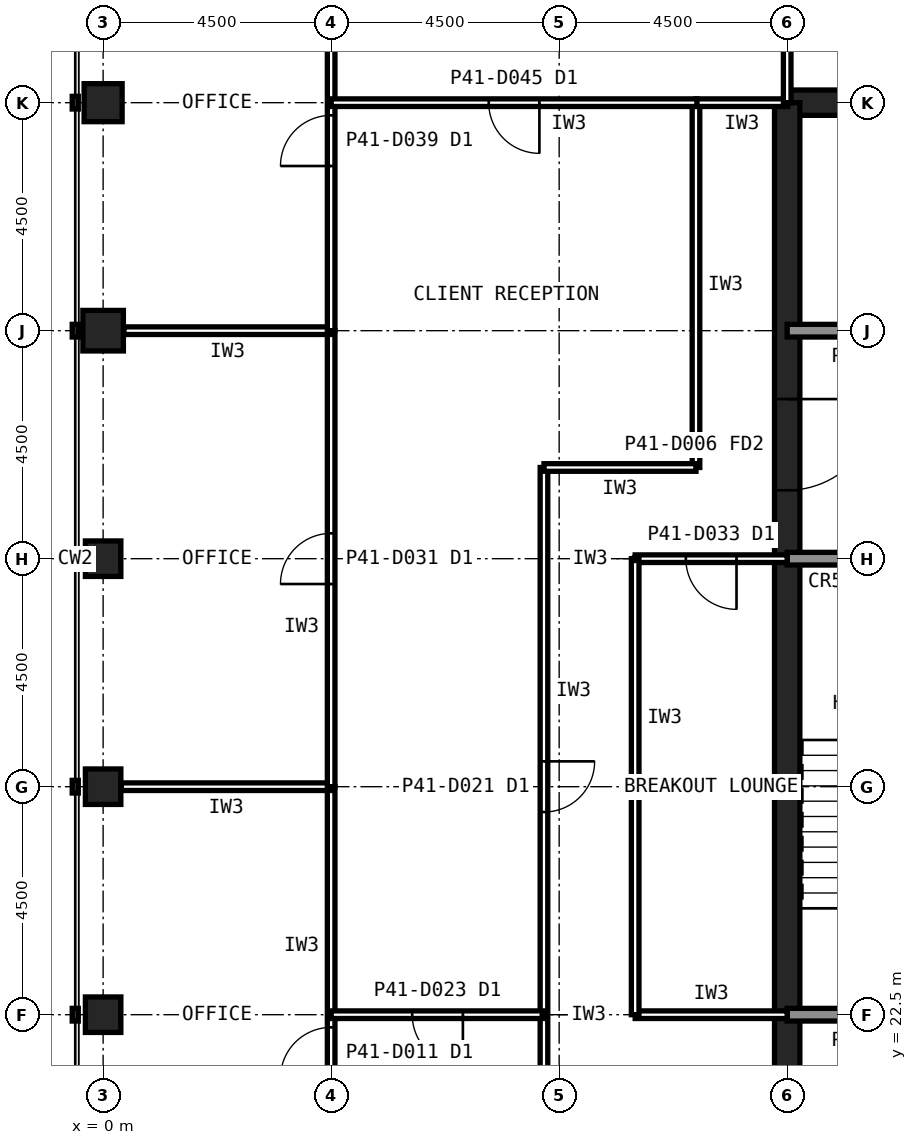
"""IFC4 building model, lengths in metres.
Left out: names, types, materials, properties, quantities, classifications, styles, units other than length and angle.
Written with IfcOpenShell. Run it as: python <this file> out.ifc"""

import sys

from ifc_helpers import new_model, si_unit, direction, frame, frame_2d, origin, origin_2d, place, context, subcontext, project, spatial, rectangle, hollow_rectangle, extrude, element, fill, save


model = new_model("IFC4")
c1 = context("Model", 3, precision=1e-05, world=origin(), true_north=direction((0.0, 1.0)))
c2 = subcontext(c1, "Body", "Model", "MODEL_VIEW")
j1 = project(units=[si_unit("LENGTHUNIT", "METRE"), si_unit("PLANEANGLEUNIT", "RADIAN")], contexts=[c1])
p1 = place(None, origin())
s1 = spatial("IfcSite", under=j1, at=p1, CompositionType="ELEMENT")
p2 = place(p1, origin())
s2 = spatial("IfcBuilding", under=s1, at=p2, CompositionType="ELEMENT")
p3 = place(p2, frame((0.0, 0.0, 175.6)))
s3 = spatial("IfcBuildingStorey", under=s2, at=p3, CompositionType="ELEMENT", Elevation=175.6)
p4 = place(p3, frame((0.0, 40.5, 0.0), z_axis=(0.0, 0.0, 1.0), x_axis=(1.0, 0.0, 0.0)))
e1 = element("IfcColumn", 1, at=p4, inside=s3, PredefinedType="COLUMN", context=c2, shape_type="SweptSolid", body=[
    extrude(hollow_rectangle(XDim=0.75, YDim=0.75, WallThickness=0.04, at=origin_2d()), origin(), (0.0, 0.0, 1.0), 4.0),
])
p5 = place(p3, frame((0.0, 36.0, 0.0), z_axis=(0.0, 0.0, 1.0), x_axis=(1.0, 0.0, 0.0)))
e2 = element("IfcColumn", 2, at=p5, inside=s3, PredefinedType="COLUMN", context=c2, shape_type="SweptSolid", body=[
    extrude(hollow_rectangle(XDim=0.8, YDim=0.8, WallThickness=0.045, at=origin_2d()), origin(), (0.0, 0.0, 1.0), 4.0),
])
for number, where, z_axis, x_axis in (
    (3, (0.0, 31.5, 0.0), (0.0, 0.0, 1.0), (1.0, 0.0, 0.0)),
    (4, (0.0, 27.0, 0.0), (0.0, 0.0, 1.0), (1.0, 0.0, 0.0)),
    (5, (0.0, 22.5, 0.0), (0.0, 0.0, 1.0), (1.0, 0.0, 0.0)),
):
    element("IfcColumn", number, at=place(p3, frame(where, z_axis=z_axis, x_axis=x_axis)), inside=s3, PredefinedType="COLUMN", context=c2, shape_type="SweptSolid", body=[
        extrude(hollow_rectangle(XDim=0.7, YDim=0.7, WallThickness=0.036, at=origin_2d()), origin(), (0.0, 0.0, 1.0), 4.0),
    ])
p6 = place(p3, frame((40.5, 40.5, 0.0), z_axis=(0.0, 0.0, 1.0), x_axis=(-1.0, 0.0, 0.0)))
e6 = element("IfcWall", 6, at=p6, inside=s3, PredefinedType="SHEAR", context=c2, shape_type="SweptSolid", body=[
    extrude(rectangle(XDim=27.0, YDim=0.5, at=frame_2d((13.5, 0.0))), origin(), (0.0, 0.0, 1.0), 4.0),
])
p7 = place(p3, frame((13.5, 40.5, 0.0), z_axis=(0.0, 0.0, 1.0), x_axis=(0.0, -1.0, 0.0)))
e7 = element("IfcWall", 7, at=p7, inside=s3, PredefinedType="SHEAR", context=c2, shape_type="SweptSolid", body=[
    extrude(rectangle(XDim=27.0, YDim=0.5, at=frame_2d((13.5, 0.0))), origin(), (0.0, 0.0, 1.0), 4.0),
])
p8 = place(p7, frame((19.65, 0.0, 0.0)))
e8 = element("IfcOpeningElement", 8, at=p8, cuts=e7, PredefinedType="OPENING", context=c2, shape_type="SweptSolid", body=[
    extrude(rectangle(XDim=1.2, YDim=2.1, at=frame_2d((0.6, 1.05))), frame((0.0, 0.26, 0.0), z_axis=(0.0, -1.0, 0.0), x_axis=(1.0, 0.0, 0.0)), (0.0, 0.0, 1.0), 0.52),
])
p9 = place(p7, frame((5.85, 0.0, 0.0)))
e9 = element("IfcOpeningElement", 9, at=p9, cuts=e7, PredefinedType="OPENING", context=c2, shape_type="SweptSolid", body=[
    extrude(rectangle(XDim=1.8, YDim=2.1, at=frame_2d((0.9, 1.05))), frame((0.0, 0.26, 0.0), z_axis=(0.0, -1.0, 0.0), x_axis=(1.0, 0.0, 0.0)), (0.0, 0.0, 1.0), 0.52),
])
p10 = place(p3, frame((13.5, 36.0, 0.0), z_axis=(0.0, 0.0, 1.0), x_axis=(1.0, 0.0, 0.0)))
e10 = element("IfcWall", 10, at=p10, inside=s3, PredefinedType="SOLIDWALL", context=c2, shape_type="SweptSolid", body=[
    extrude(rectangle(XDim=27.0, YDim=0.25, at=frame_2d((13.5, 0.0))), origin(), (0.0, 0.0, 1.0), 3.84),
])
p11 = place(p10, frame((1.8, 0.0, 0.0)))
e11 = element("IfcOpeningElement", 11, at=p11, cuts=e10, PredefinedType="OPENING", context=c2, shape_type="SweptSolid", body=[
    extrude(rectangle(XDim=0.9, YDim=2.1, at=frame_2d((0.45, 1.05))), frame((0.0, 0.135, 0.0), z_axis=(0.0, -1.0, 0.0), x_axis=(1.0, 0.0, 0.0)), (0.0, 0.0, 1.0), 0.27),
])
p12 = place(p10, frame((5.55, 0.0, 0.0)))
e12 = element("IfcOpeningElement", 12, at=p12, cuts=e10, PredefinedType="OPENING", context=c2, shape_type="SweptSolid", body=[
    extrude(rectangle(XDim=0.9, YDim=2.1, at=frame_2d((0.45, 1.05))), frame((0.0, 0.135, 0.0), z_axis=(0.0, -1.0, 0.0), x_axis=(1.0, 0.0, 0.0)), (0.0, 0.0, 1.0), 0.27),
])
p13 = place(p10, frame((8.55, 0.0, 0.0)))
e13 = element("IfcOpeningElement", 13, at=p13, cuts=e10, PredefinedType="OPENING", context=c2, shape_type="SweptSolid", body=[
    extrude(rectangle(XDim=0.9, YDim=2.1, at=frame_2d((0.45, 1.05))), frame((0.0, 0.135, 0.0), z_axis=(0.0, -1.0, 0.0), x_axis=(1.0, 0.0, 0.0)), (0.0, 0.0, 1.0), 0.27),
])
p14 = place(p10, frame((11.55, 0.0, 0.0)))
e14 = element("IfcOpeningElement", 14, at=p14, cuts=e10, PredefinedType="OPENING", context=c2, shape_type="SweptSolid", body=[
    extrude(rectangle(XDim=0.9, YDim=2.1, at=frame_2d((0.45, 1.05))), frame((0.0, 0.135, 0.0), z_axis=(0.0, -1.0, 0.0), x_axis=(1.0, 0.0, 0.0)), (0.0, 0.0, 1.0), 0.27),
])
p15 = place(p10, frame((24.1, 0.0, 0.0)))
e15 = element("IfcOpeningElement", 15, at=p15, cuts=e10, PredefinedType="OPENING", context=c2, shape_type="SweptSolid", body=[
    extrude(rectangle(XDim=1.3, YDim=2.2, at=frame_2d((0.65, 1.1))), frame((0.0, 0.135, 0.0), z_axis=(0.0, -1.0, 0.0), x_axis=(1.0, 0.0, 0.0)), (0.0, 0.0, 1.0), 0.27),
])
p16 = place(p3, frame((13.5, 22.5, 0.0), z_axis=(0.0, 0.0, 1.0), x_axis=(1.0, 0.0, 0.0)))
e16 = element("IfcWall", 16, at=p16, inside=s3, PredefinedType="SOLIDWALL", context=c2, shape_type="SweptSolid", body=[
    extrude(rectangle(XDim=27.0, YDim=0.25, at=frame_2d((13.5, 0.0))), origin(), (0.0, 0.0, 1.0), 3.84),
])
p17 = place(p16, frame((1.65, 0.0, 0.0)))
e17 = element("IfcOpeningElement", 17, at=p17, cuts=e16, PredefinedType="OPENING", context=c2, shape_type="SweptSolid", body=[
    extrude(rectangle(XDim=1.2, YDim=2.1, at=frame_2d((0.6, 1.05))), frame((0.0, 0.135, 0.0), z_axis=(0.0, -1.0, 0.0), x_axis=(1.0, 0.0, 0.0)), (0.0, 0.0, 1.0), 0.27),
])
p18 = place(p16, frame((6.025, 0.0, 0.0)))
e18 = element("IfcOpeningElement", 18, at=p18, cuts=e16, PredefinedType="OPENING", context=c2, shape_type="SweptSolid", body=[
    extrude(rectangle(XDim=1.0, YDim=2.1, at=frame_2d((0.5, 1.05))), frame((0.0, 0.135, 0.0), z_axis=(0.0, -1.0, 0.0), x_axis=(1.0, 0.0, 0.0)), (0.0, 0.0, 1.0), 0.27),
])
p19 = place(p16, frame((10.525, 0.0, 0.0)))
e19 = element("IfcOpeningElement", 19, at=p19, cuts=e16, PredefinedType="OPENING", context=c2, shape_type="SweptSolid", body=[
    extrude(rectangle(XDim=1.0, YDim=2.1, at=frame_2d((0.5, 1.05))), frame((0.0, 0.135, 0.0), z_axis=(0.0, -1.0, 0.0), x_axis=(1.0, 0.0, 0.0)), (0.0, 0.0, 1.0), 0.27),
])
p20 = place(p16, frame((19.75, 0.0, 0.0)))
e20 = element("IfcOpeningElement", 20, at=p20, cuts=e16, PredefinedType="OPENING", context=c2, shape_type="SweptSolid", body=[
    extrude(rectangle(XDim=1.0, YDim=2.1, at=frame_2d((0.5, 1.05))), frame((0.0, 0.135, 0.0), z_axis=(0.0, -1.0, 0.0), x_axis=(1.0, 0.0, 0.0)), (0.0, 0.0, 1.0), 0.27),
])
p21 = place(p16, frame((15.05, 0.0, 0.0)))
e21 = element("IfcOpeningElement", 21, at=p21, cuts=e16, PredefinedType="OPENING", context=c2, shape_type="SweptSolid", body=[
    extrude(rectangle(XDim=1.4, YDim=2.4, at=frame_2d((0.7, 1.2))), frame((0.0, 0.135, 0.0), z_axis=(0.0, -1.0, 0.0), x_axis=(1.0, 0.0, 0.0)), (0.0, 0.0, 1.0), 0.27),
])
p22 = place(p3, frame((13.5, 31.5, 0.0), z_axis=(0.0, 0.0, 1.0), x_axis=(1.0, 0.0, 0.0)))
e22 = element("IfcWall", 22, at=p22, inside=s3, PredefinedType="SOLIDWALL", context=c2, shape_type="SweptSolid", body=[
    extrude(rectangle(XDim=27.0, YDim=0.25, at=frame_2d((13.5, 0.0))), origin(), (0.0, 0.0, 1.0), 3.84),
])
p23 = place(p22, frame((24.15, 0.0, 0.0)))
e23 = element("IfcOpeningElement", 23, at=p23, cuts=e22, PredefinedType="OPENING", context=c2, shape_type="SweptSolid", body=[
    extrude(rectangle(XDim=1.2, YDim=2.1, at=frame_2d((0.6, 1.05))), frame((0.0, 0.135, 0.0), z_axis=(0.0, -1.0, 0.0), x_axis=(1.0, 0.0, 0.0)), (0.0, 0.0, 1.0), 0.27),
])
p24 = place(p22, frame((15.3, 0.0, 0.0)))
e24 = element("IfcOpeningElement", 24, at=p24, cuts=e22, PredefinedType="OPENING", context=c2, shape_type="SweptSolid", body=[
    extrude(rectangle(XDim=0.9, YDim=2.1, at=frame_2d((0.45, 1.05))), frame((0.0, 0.135, 0.0), z_axis=(0.0, -1.0, 0.0), x_axis=(1.0, 0.0, 0.0)), (0.0, 0.0, 1.0), 0.27),
])
p25 = place(p22, frame((19.8, 0.0, 0.0)))
e25 = element("IfcOpeningElement", 25, at=p25, cuts=e22, PredefinedType="OPENING", context=c2, shape_type="SweptSolid", body=[
    extrude(rectangle(XDim=0.9, YDim=2.1, at=frame_2d((0.45, 1.05))), frame((0.0, 0.135, 0.0), z_axis=(0.0, -1.0, 0.0), x_axis=(1.0, 0.0, 0.0)), (0.0, 0.0, 1.0), 0.27),
])
p26 = place(p3, frame((8.7, 33.3, 0.0), z_axis=(0.0, 0.0, 1.0), x_axis=(0.0, -1.0, 0.0)))
e26 = element("IfcWall", 26, at=p26, inside=s3, PredefinedType="PARTITIONING", context=c2, shape_type="SweptSolid", body=[
    extrude(rectangle(XDim=12.6, YDim=0.15, at=frame_2d((6.3, 0.0))), origin(), (0.0, 0.0, 1.0), 3.84),
])
p27 = place(p26, frame((5.8, 0.0, 0.0)))
e27 = element("IfcOpeningElement", 27, at=p27, cuts=e26, PredefinedType="OPENING", context=c2, shape_type="SweptSolid", body=[
    extrude(rectangle(XDim=1.0, YDim=2.1, at=frame_2d((0.5, 1.05))), frame((0.0, 0.085, 0.0), z_axis=(0.0, -1.0, 0.0), x_axis=(1.0, 0.0, 0.0)), (0.0, 0.0, 1.0), 0.17),
])
p28 = place(p3, frame((11.7, 40.5, 0.0), z_axis=(0.0, 0.0, 1.0), x_axis=(0.0, -1.0, 0.0)))
e28 = element("IfcWall", 28, at=p28, inside=s3, PredefinedType="PARTITIONING", context=c2, shape_type="SweptSolid", body=[
    extrude(rectangle(XDim=7.2, YDim=0.15, at=frame_2d((3.6, 0.0))), origin(), (0.0, 0.0, 1.0), 3.84),
])
p29 = place(p3, frame((11.7, 33.3, 0.0), z_axis=(0.0, 0.0, 1.0), x_axis=(-1.0, 0.0, 0.0)))
e29 = element("IfcWall", 29, at=p29, inside=s3, PredefinedType="PARTITIONING", context=c2, shape_type="SweptSolid", body=[
    extrude(rectangle(XDim=3.0, YDim=0.15, at=frame_2d((1.5, 0.0))), origin(), (0.0, 0.0, 1.0), 3.84),
])
p30 = place(p3, frame((13.51, 40.5, 0.0), z_axis=(0.0, 0.0, 1.0), x_axis=(-1.0, 0.0, 0.0)))
e30 = element("IfcWall", 30, at=p30, inside=s3, PredefinedType="PARTITIONING", context=c2, shape_type="SweptSolid", body=[
    extrude(rectangle(XDim=1.81, YDim=0.15, at=frame_2d((0.905, 0.0))), origin(), (0.0, 0.0, 1.0), 2.989),
])
p31 = place(p3, frame((4.5, 18.0, 0.0), z_axis=(0.0, 0.0, 1.0), x_axis=(0.0, 1.0, 0.0)))
e31 = element("IfcWall", 31, at=p31, inside=s3, PredefinedType="PARTITIONING", context=c2, shape_type="SweptSolid", body=[
    extrude(rectangle(XDim=9.0, YDim=0.15, at=frame_2d((4.5, 0.0))), origin(), (0.0, 0.0, 1.0), 3.84),
])
p32 = place(p31, frame((3.25, 0.0, 0.0)))
e32 = element("IfcOpeningElement", 32, at=p32, cuts=e31, PredefinedType="OPENING", context=c2, shape_type="SweptSolid", body=[
    extrude(rectangle(XDim=1.0, YDim=2.1, at=frame_2d((0.5, 1.05))), frame((0.0, 0.085, 0.0), z_axis=(0.0, -1.0, 0.0), x_axis=(1.0, 0.0, 0.0)), (0.0, 0.0, 1.0), 0.17),
])
p33 = place(p3, frame((4.5, 27.0, 0.0), z_axis=(0.0, 0.0, 1.0), x_axis=(-1.0, 0.0, 0.0)))
e33 = element("IfcWall", 33, at=p33, inside=s3, PredefinedType="PARTITIONING", context=c2, shape_type="SweptSolid", body=[
    extrude(rectangle(XDim=4.14, YDim=0.15, at=frame_2d((2.07, 0.0))), origin(), (0.0, 0.0, 1.0), 2.989),
])
p34 = place(p3, frame((4.5, 27.0, 0.0), z_axis=(0.0, 0.0, 1.0), x_axis=(0.0, 1.0, 0.0)))
e34 = element("IfcWall", 34, at=p34, inside=s3, PredefinedType="PARTITIONING", context=c2, shape_type="SweptSolid", body=[
    extrude(rectangle(XDim=9.0, YDim=0.15, at=frame_2d((4.5, 0.0))), origin(), (0.0, 0.0, 1.0), 3.84),
])
p35 = place(p34, frame((4.0, 0.0, 0.0)))
e35 = element("IfcOpeningElement", 35, at=p35, cuts=e34, PredefinedType="OPENING", context=c2, shape_type="SweptSolid", body=[
    extrude(rectangle(XDim=1.0, YDim=2.1, at=frame_2d((0.5, 1.05))), frame((0.0, 0.085, 0.0), z_axis=(0.0, -1.0, 0.0), x_axis=(1.0, 0.0, 0.0)), (0.0, 0.0, 1.0), 0.17),
])
p36 = place(p3, frame((4.5, 36.0, 0.0), z_axis=(0.0, 0.0, 1.0), x_axis=(-1.0, 0.0, 0.0)))
e36 = element("IfcWall", 36, at=p36, inside=s3, PredefinedType="PARTITIONING", context=c2, shape_type="SweptSolid", body=[
    extrude(rectangle(XDim=4.09, YDim=0.15, at=frame_2d((2.045, 0.0))), origin(), (0.0, 0.0, 1.0), 2.989),
])
p37 = place(p3, frame((4.5, 36.0, 0.0), z_axis=(0.0, 0.0, 1.0), x_axis=(0.0, 1.0, 0.0)))
e37 = element("IfcWall", 37, at=p37, inside=s3, PredefinedType="PARTITIONING", context=c2, shape_type="SweptSolid", body=[
    extrude(rectangle(XDim=9.0, YDim=0.15, at=frame_2d((4.5, 0.0))), origin(), (0.0, 0.0, 1.0), 3.84),
])
p38 = place(p37, frame((3.25, 0.0, 0.0)))
e38 = element("IfcOpeningElement", 38, at=p38, cuts=e37, PredefinedType="OPENING", context=c2, shape_type="SweptSolid", body=[
    extrude(rectangle(XDim=1.0, YDim=2.1, at=frame_2d((0.5, 1.05))), frame((0.0, 0.085, 0.0), z_axis=(0.0, -1.0, 0.0), x_axis=(1.0, 0.0, 0.0)), (0.0, 0.0, 1.0), 0.17),
])
p39 = place(p3, frame((10.5, 22.5, 0.0), z_axis=(0.0, 0.0, 1.0), x_axis=(1.0, 0.0, 0.0)))
e39 = element("IfcWall", 39, at=p39, inside=s3, PredefinedType="PARTITIONING", context=c2, shape_type="SweptSolid", body=[
    extrude(rectangle(XDim=3.0, YDim=0.15, at=frame_2d((1.5, 0.0))), origin(), (0.0, 0.0, 1.0), 2.989),
])
p40 = place(p3, frame((13.5, 31.5, 0.0), z_axis=(0.0, 0.0, 1.0), x_axis=(-1.0, 0.0, 0.0)))
e40 = element("IfcWall", 40, at=p40, inside=s3, PredefinedType="PARTITIONING", context=c2, shape_type="SweptSolid", body=[
    extrude(rectangle(XDim=3.0, YDim=0.15, at=frame_2d((1.5, 0.0))), origin(), (0.0, 0.0, 1.0), 2.989),
])
p41 = place(p40, frame((1.0, 0.0, 0.0)))
e41 = element("IfcOpeningElement", 41, at=p41, cuts=e40, PredefinedType="OPENING", context=c2, shape_type="SweptSolid", body=[
    extrude(rectangle(XDim=1.0, YDim=2.1, at=frame_2d((0.5, 1.05))), frame((0.0, 0.085, 0.0), z_axis=(0.0, -1.0, 0.0), x_axis=(1.0, 0.0, 0.0)), (0.0, 0.0, 1.0), 0.17),
])
p42 = place(p3, frame((10.5, 31.5, 0.0), z_axis=(0.0, 0.0, 1.0), x_axis=(0.0, -1.0, 0.0)))
e42 = element("IfcWall", 42, at=p42, inside=s3, PredefinedType="PARTITIONING", context=c2, shape_type="SweptSolid", body=[
    extrude(rectangle(XDim=9.0, YDim=0.15, at=frame_2d((4.5, 0.0))), origin(), (0.0, 0.0, 1.0), 3.84),
])
p43 = place(p3, frame((13.5, 40.5, 0.0), z_axis=(0.0, 0.0, 1.0), x_axis=(0.0, 1.0, 0.0)))
e43 = element("IfcWall", 43, at=p43, inside=s3, PredefinedType="PARTITIONING", context=c2, shape_type="SweptSolid", body=[
    extrude(rectangle(XDim=13.105, YDim=0.15, at=frame_2d((6.552, 0.0))), origin(), (0.0, 0.0, 1.0), 2.989),
])
p44 = place(p43, frame((6.052, 0.0, 0.0)))
e44 = element("IfcOpeningElement", 44, at=p44, cuts=e43, PredefinedType="OPENING", context=c2, shape_type="SweptSolid", body=[
    extrude(rectangle(XDim=1.0, YDim=2.1, at=frame_2d((0.5, 1.05))), frame((0.0, 0.085, 0.0), z_axis=(0.0, -1.0, 0.0), x_axis=(1.0, 0.0, 0.0)), (0.0, 0.0, 1.0), 0.17),
])
p45 = place(p3, frame((11.72, 40.5, 0.0), z_axis=(0.0, 0.0, 1.0), x_axis=(-1.0, 0.0, 0.0)))
e45 = element("IfcWall", 45, at=p45, inside=s3, PredefinedType="PARTITIONING", context=c2, shape_type="SweptSolid", body=[
    extrude(rectangle(XDim=7.22, YDim=0.15, at=frame_2d((3.61, 0.0))), origin(), (0.0, 0.0, 1.0), 2.989),
])
p46 = place(p45, frame((3.11, 0.0, 0.0)))
e46 = element("IfcOpeningElement", 46, at=p46, cuts=e45, PredefinedType="OPENING", context=c2, shape_type="SweptSolid", body=[
    extrude(rectangle(XDim=1.0, YDim=2.1, at=frame_2d((0.5, 1.05))), frame((0.0, 0.085, 0.0), z_axis=(0.0, -1.0, 0.0), x_axis=(1.0, 0.0, 0.0)), (0.0, 0.0, 1.0), 0.17),
])
p47 = place(p3, frame((8.7, 22.5, 0.0), z_axis=(0.0, 0.0, 1.0), x_axis=(-1.0, 0.0, 0.0)))
e47 = element("IfcWall", 47, at=p47, inside=s3, PredefinedType="PARTITIONING", context=c2, shape_type="SweptSolid", body=[
    extrude(rectangle(XDim=4.2, YDim=0.15, at=frame_2d((2.1, 0.0))), origin(), (0.0, 0.0, 1.0), 2.989),
])
p48 = place(p47, frame((1.6, 0.0, 0.0)))
e48 = element("IfcOpeningElement", 48, at=p48, cuts=e47, PredefinedType="OPENING", context=c2, shape_type="SweptSolid", body=[
    extrude(rectangle(XDim=1.0, YDim=2.1, at=frame_2d((0.5, 1.05))), frame((0.0, 0.085, 0.0), z_axis=(0.0, -1.0, 0.0), x_axis=(1.0, 0.0, 0.0)), (0.0, 0.0, 1.0), 0.17),
])
p49 = place(p9, origin())
e49 = element("IfcDoor", 49, at=p49, inside=s3, OperationType="SINGLE_SWING_LEFT", PredefinedType="DOOR", context=c2, shape_type="SweptSolid", body=[
    extrude(rectangle(XDim=1.8, YDim=2.1, at=frame_2d((0.9, 1.05))), frame((0.0, 0.025, 0.0), z_axis=(0.0, -1.0, 0.0), x_axis=(1.0, 0.0, 0.0)), (0.0, 0.0, 1.0), 0.05),
])
fill(e9, e49)
p50 = place(p27, origin())
e50 = element("IfcDoor", 50, at=p50, inside=s3, OperationType="SINGLE_SWING_LEFT", PredefinedType="DOOR", context=c2, shape_type="SweptSolid", body=[
    extrude(rectangle(XDim=1.0, YDim=2.1, at=frame_2d((0.5, 1.05))), frame((0.0, 0.025, 0.0), z_axis=(0.0, -1.0, 0.0), x_axis=(1.0, 0.0, 0.0)), (0.0, 0.0, 1.0), 0.05),
])
fill(e27, e50)
p51 = place(p32, origin())
e51 = element("IfcDoor", 51, at=p51, inside=s3, OperationType="SINGLE_SWING_LEFT", PredefinedType="DOOR", context=c2, shape_type="SweptSolid", body=[
    extrude(rectangle(XDim=1.0, YDim=2.1, at=frame_2d((0.5, 1.05))), frame((0.0, 0.025, 0.0), z_axis=(0.0, -1.0, 0.0), x_axis=(1.0, 0.0, 0.0)), (0.0, 0.0, 1.0), 0.05),
])
fill(e32, e51)
p52 = place(p35, origin())
e52 = element("IfcDoor", 52, at=p52, inside=s3, OperationType="SINGLE_SWING_LEFT", PredefinedType="DOOR", context=c2, shape_type="SweptSolid", body=[
    extrude(rectangle(XDim=1.0, YDim=2.1, at=frame_2d((0.5, 1.05))), frame((0.0, 0.025, 0.0), z_axis=(0.0, -1.0, 0.0), x_axis=(1.0, 0.0, 0.0)), (0.0, 0.0, 1.0), 0.05),
])
fill(e35, e52)
p53 = place(p38, origin())
e53 = element("IfcDoor", 53, at=p53, inside=s3, OperationType="SINGLE_SWING_LEFT", PredefinedType="DOOR", context=c2, shape_type="SweptSolid", body=[
    extrude(rectangle(XDim=1.0, YDim=2.1, at=frame_2d((0.5, 1.05))), frame((0.0, 0.025, 0.0), z_axis=(0.0, -1.0, 0.0), x_axis=(1.0, 0.0, 0.0)), (0.0, 0.0, 1.0), 0.05),
])
fill(e38, e53)
p54 = place(p41, origin())
e54 = element("IfcDoor", 54, at=p54, inside=s3, OperationType="SINGLE_SWING_LEFT", PredefinedType="DOOR", context=c2, shape_type="SweptSolid", body=[
    extrude(rectangle(XDim=1.0, YDim=2.1, at=frame_2d((0.5, 1.05))), frame((0.0, 0.025, 0.0), z_axis=(0.0, -1.0, 0.0), x_axis=(1.0, 0.0, 0.0)), (0.0, 0.0, 1.0), 0.05),
])
fill(e41, e54)
p55 = place(p46, origin())
e55 = element("IfcDoor", 55, at=p55, inside=s3, OperationType="SINGLE_SWING_LEFT", PredefinedType="DOOR", context=c2, shape_type="SweptSolid", body=[
    extrude(rectangle(XDim=1.0, YDim=2.1, at=frame_2d((0.5, 1.05))), frame((0.0, 0.025, 0.0), z_axis=(0.0, -1.0, 0.0), x_axis=(1.0, 0.0, 0.0)), (0.0, 0.0, 1.0), 0.05),
])
fill(e46, e55)
p56 = place(p48, origin())
e56 = element("IfcDoor", 56, at=p56, inside=s3, OperationType="SINGLE_SWING_LEFT", PredefinedType="DOOR", context=c2, shape_type="SweptSolid", body=[
    extrude(rectangle(XDim=1.0, YDim=2.1, at=frame_2d((0.5, 1.05))), frame((0.0, 0.025, 0.0), z_axis=(0.0, -1.0, 0.0), x_axis=(1.0, 0.0, 0.0)), (0.0, 0.0, 1.0), 0.05),
])
fill(e48, e56)
save(model, sys.argv[1])
